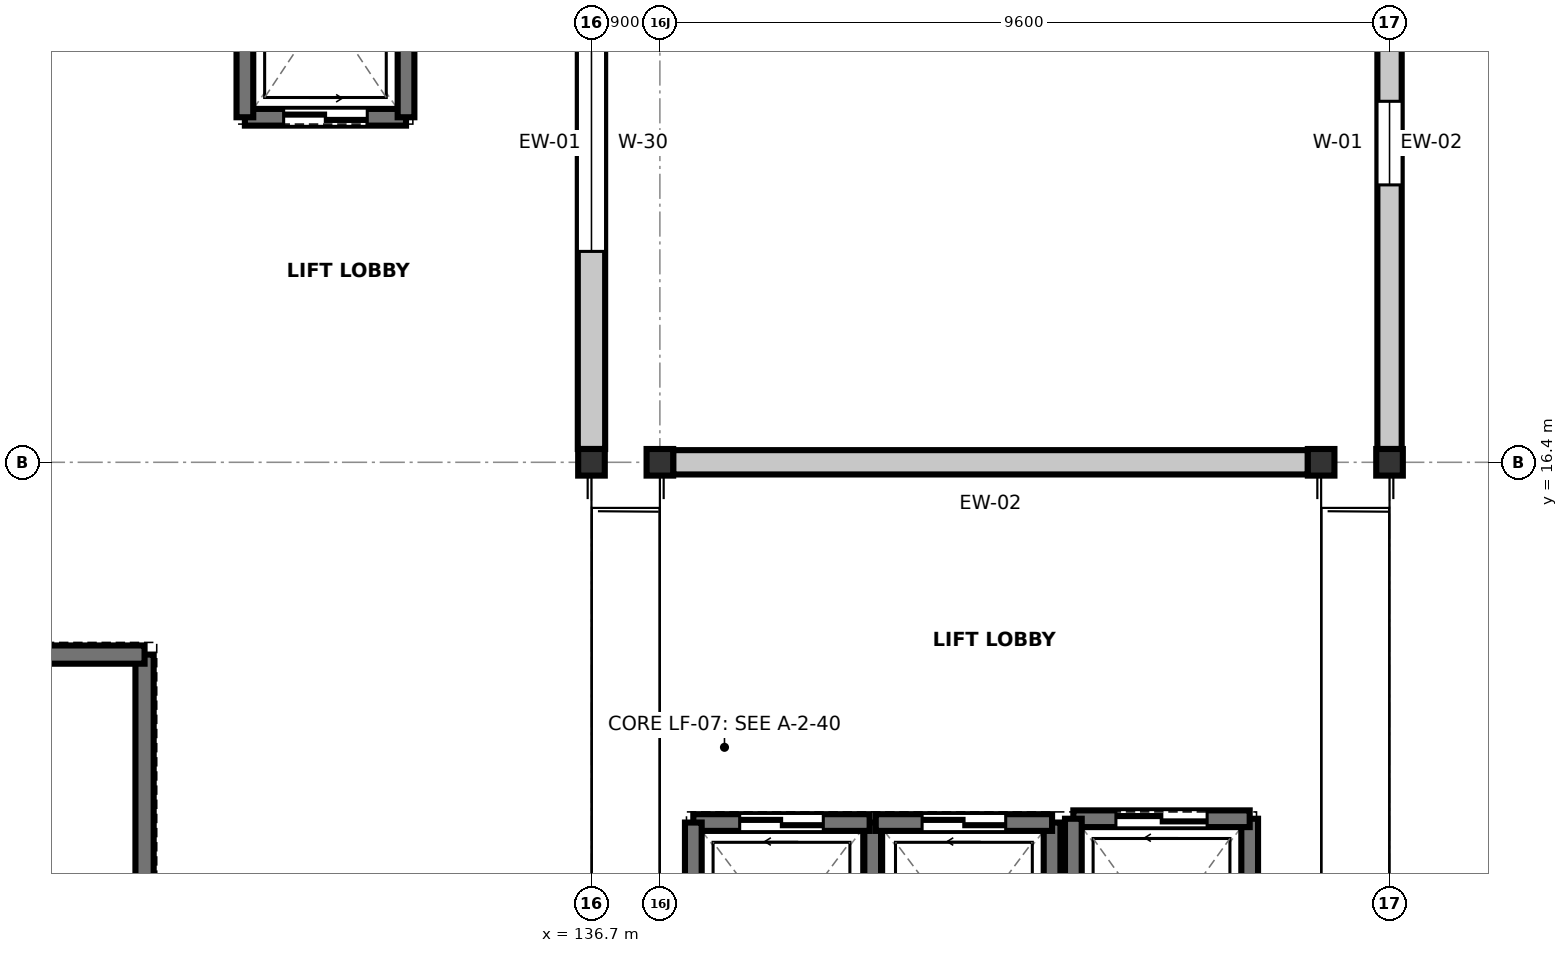
"""IFC4 building model, lengths in metres.
Left out: names, types, materials, properties, quantities, classifications, styles, units other than length and angle.
Written with IfcOpenShell. Run it as: python <this file> out.ifc"""

import sys

from ifc_helpers import new_model, si_unit, direction, frame, frame_2d, origin, origin_2d, place, context, subcontext, project, spatial, rectangle, i_section, extrude, element, fill, save


model = new_model("IFC4")
c1 = context("Model", 3, precision=1e-05, world=origin(), true_north=direction((0.0, 1.0)))
c2 = subcontext(c1, "Body", "Model", "MODEL_VIEW")
j1 = project(units=[si_unit("LENGTHUNIT", "METRE"), si_unit("PLANEANGLEUNIT", "RADIAN")], contexts=[c1])
p1 = place(None, origin())
s1 = spatial("IfcSite", under=j1, at=p1, CompositionType="ELEMENT")
p2 = place(p1, origin())
s2 = spatial("IfcBuilding", under=s1, at=p2, CompositionType="ELEMENT")
p3 = place(p2, frame((0.0, 0.0, 14.4)))
s3 = spatial("IfcBuildingStorey", under=s2, at=p3, CompositionType="ELEMENT", Elevation=14.4)
for number, where, z_axis, x_axis in (
    (1, (136.7, 16.4, 0.0), (0.0, 0.0, 1.0), (1.0, 0.0, 0.0)),
    (2, (137.6, 16.4, 0.0), (0.0, 0.0, 1.0), (1.0, 0.0, 0.0)),
    (3, (146.3, 16.4, 0.0), (0.0, 0.0, 1.0), (1.0, 0.0, 0.0)),
    (4, (147.2, 16.4, 0.0), (0.0, 0.0, 1.0), (1.0, 0.0, 0.0)),
):
    element("IfcColumn", number, at=place(p3, frame(where, z_axis=z_axis, x_axis=x_axis)), inside=s3, PredefinedType="COLUMN", context=c2, shape_type="SweptSolid", body=[
        extrude(i_section(OverallWidth=0.35, OverallDepth=0.35, WebThickness=0.012, FlangeThickness=0.019, FilletRadius=0.02, at=origin_2d()), origin(), (0.0, 0.0, 1.0), 4.8),
    ])
p4 = place(p3, frame((136.7, 16.575, 0.0), z_axis=(0.0, 0.0, 1.0), x_axis=(0.0, 1.0, 0.0)))
e5 = element("IfcWall", 5, at=p4, inside=s3, PredefinedType="STANDARD", context=c2, shape_type="SweptSolid", body=[
    extrude(rectangle(XDim=8.05, YDim=0.36, at=frame_2d((4.025, 0.0))), origin(), (0.0, 0.0, 1.0), 3.515),
])
p5 = place(p4, frame((2.6, 0.0, 0.95)))
e6 = element("IfcOpeningElement", 6, at=p5, cuts=e5, PredefinedType="OPENING", context=c2, shape_type="SweptSolid", body=[
    extrude(rectangle(XDim=2.85, YDim=1.7, at=frame_2d((1.425, 0.85))), frame((0.0, 0.19, 0.0), z_axis=(0.0, -1.0, 0.0), x_axis=(1.0, 0.0, 0.0)), (0.0, 0.0, 1.0), 0.38),
])
p6 = place(p3, frame((146.125, 16.4, 0.0), z_axis=(0.0, 0.0, 1.0), x_axis=(-1.0, 0.0, 0.0)))
e7 = element("IfcWall", 7, at=p6, inside=s3, PredefinedType="STANDARD", context=c2, shape_type="SweptSolid", body=[
    extrude(rectangle(XDim=8.35, YDim=0.32, at=frame_2d((4.175, 0.0))), origin(), (0.0, 0.0, 1.0), 3.535),
])
p7 = place(p3, frame((147.2, 24.625, 0.0), z_axis=(0.0, 0.0, 1.0), x_axis=(0.0, -1.0, 0.0)))
e8 = element("IfcWall", 8, at=p7, inside=s3, PredefinedType="STANDARD", context=c2, shape_type="SweptSolid", body=[
    extrude(rectangle(XDim=8.05, YDim=0.32, at=frame_2d((4.025, 0.0))), origin(), (0.0, 0.0, 1.0), 3.997),
])
p8 = place(p7, frame((3.475, 0.0, 0.95)))
e9 = element("IfcOpeningElement", 9, at=p8, cuts=e8, PredefinedType="OPENING", context=c2, shape_type="SweptSolid", body=[
    extrude(rectangle(XDim=1.1, YDim=1.45, at=frame_2d((0.55, 0.725))), frame((0.0, 0.17, 0.0), z_axis=(0.0, -1.0, 0.0), x_axis=(1.0, 0.0, 0.0)), (0.0, 0.0, 1.0), 0.34),
])
p9 = place(p3, frame((130.82, 9.68, 0.0), z_axis=(0.0, 0.0, 1.0), x_axis=(0.0, 1.0, 0.0)))
e10 = element("IfcWall", 10, at=p9, inside=s3, PredefinedType="SHEAR", context=c2, shape_type="SweptSolid", body=[
    extrude(rectangle(XDim=4.19, YDim=0.24, at=frame_2d((2.095, 0.0))), origin(), (0.0, 0.0, 1.0), 4.5),
])
p10 = place(p3, frame((130.82, 13.87, 0.0), z_axis=(0.0, 0.0, 1.0), x_axis=(-1.0, 0.0, 0.0)))
e11 = element("IfcWall", 11, at=p10, inside=s3, PredefinedType="SHEAR", context=c2, shape_type="SweptSolid", body=[
    extrude(rectangle(XDim=8.54, YDim=0.24, at=frame_2d((4.27, 0.0))), origin(), (0.0, 0.0, 1.0), 4.5),
])
p11 = place(p3, frame((140.4, 8.74, 0.0), z_axis=(0.0, 0.0, 1.0), x_axis=(0.0, 1.0, 0.0)))
e12 = element("IfcWall", 12, at=p11, inside=s3, PredefinedType="SHEAR", context=c2, shape_type="SweptSolid", body=[
    extrude(rectangle(XDim=2.92, YDim=0.22, at=frame_2d((1.46, 0.0))), origin(), (0.0, 0.0, 1.0), 4.5),
])
p12 = place(p3, frame((140.36, 11.66, 0.0), z_axis=(0.0, 0.0, 1.0), x_axis=(-1.0, 0.0, 0.0)))
e13 = element("IfcWall", 13, at=p12, inside=s3, PredefinedType="SHEAR", context=c2, shape_type="SweptSolid", body=[
    extrude(rectangle(XDim=2.32, YDim=0.22, at=frame_2d((1.16, 0.0))), origin(), (0.0, 0.0, 1.0), 4.5),
])
p13 = place(p12, frame((0.61, 0.0, 0.0)))
e14 = element("IfcOpeningElement", 14, at=p13, cuts=e13, PredefinedType="OPENING", context=c2, shape_type="SweptSolid", body=[
    extrude(rectangle(XDim=1.1, YDim=2.15, at=frame_2d((0.55, 1.075))), frame((0.0, 0.12, 0.0), z_axis=(0.0, -1.0, 0.0), x_axis=(1.0, 0.0, 0.0)), (0.0, 0.0, 1.0), 0.24),
])
for number, where, z_axis, x_axis in (
    (15, (138.04, 11.66, 0.0), (0.0, 0.0, 1.0), (0.0, -1.0, 0.0)),
    (16, (142.76, 8.74, 0.0), (0.0, 0.0, 1.0), (0.0, 1.0, 0.0)),
):
    element("IfcWall", number, at=place(p3, frame(where, z_axis=z_axis, x_axis=x_axis)), inside=s3, PredefinedType="SHEAR", context=c2, shape_type="SweptSolid", body=[
        extrude(rectangle(XDim=2.92, YDim=0.22, at=frame_2d((1.46, 0.0))), origin(), (0.0, 0.0, 1.0), 4.5),
    ])
p14 = place(p3, frame((142.76, 11.66, 0.0), z_axis=(0.0, 0.0, 1.0), x_axis=(-1.0, 0.0, 0.0)))
e17 = element("IfcWall", 17, at=p14, inside=s3, PredefinedType="SHEAR", context=c2, shape_type="SweptSolid", body=[
    extrude(rectangle(XDim=2.32, YDim=0.22, at=frame_2d((1.16, 0.0))), origin(), (0.0, 0.0, 1.0), 4.5),
])
p15 = place(p14, frame((0.61, 0.0, 0.0)))
e18 = element("IfcOpeningElement", 18, at=p15, cuts=e17, PredefinedType="OPENING", context=c2, shape_type="SweptSolid", body=[
    extrude(rectangle(XDim=1.1, YDim=2.15, at=frame_2d((0.55, 1.075))), frame((0.0, 0.12, 0.0), z_axis=(0.0, -1.0, 0.0), x_axis=(1.0, 0.0, 0.0)), (0.0, 0.0, 1.0), 0.24),
])
p16 = place(p3, frame((132.14, 20.94, 0.0), z_axis=(0.0, 0.0, 1.0), x_axis=(1.0, 0.0, 0.0)))
e19 = element("IfcWall", 19, at=p16, inside=s3, PredefinedType="SHEAR", context=c2, shape_type="SweptSolid", body=[
    extrude(rectangle(XDim=2.12, YDim=0.22, at=frame_2d((1.06, 0.0))), origin(), (0.0, 0.0, 1.0), 4.5),
])
p17 = place(p16, frame((0.51, 0.0, 0.0)))
e20 = element("IfcOpeningElement", 20, at=p17, cuts=e19, PredefinedType="OPENING", context=c2, shape_type="SweptSolid", body=[
    extrude(rectangle(XDim=1.1, YDim=2.15, at=frame_2d((0.55, 1.075))), frame((0.0, 0.12, 0.0), z_axis=(0.0, -1.0, 0.0), x_axis=(1.0, 0.0, 0.0)), (0.0, 0.0, 1.0), 0.24),
])
for number, where, z_axis, x_axis in (
    (21, (134.26, 20.94, 0.0), (0.0, 0.0, 1.0), (0.0, 1.0, 0.0)),
    (22, (132.14, 23.86, 0.0), (0.0, 0.0, 1.0), (0.0, -1.0, 0.0)),
):
    element("IfcWall", number, at=place(p3, frame(where, z_axis=z_axis, x_axis=x_axis)), inside=s3, PredefinedType="SHEAR", context=c2, shape_type="SweptSolid", body=[
        extrude(rectangle(XDim=2.92, YDim=0.22, at=frame_2d((1.46, 0.0))), origin(), (0.0, 0.0, 1.0), 4.5),
    ])
p18 = place(p3, frame((145.36, 8.69, 0.0), z_axis=(0.0, 0.0, 1.0), x_axis=(0.0, 1.0, 0.0)))
e23 = element("IfcWall", 23, at=p18, inside=s3, PredefinedType="SHEAR", context=c2, shape_type="SweptSolid", body=[
    extrude(rectangle(XDim=3.02, YDim=0.22, at=frame_2d((1.51, 0.0))), origin(), (0.0, 0.0, 1.0), 4.5),
])
p19 = place(p3, frame((145.36, 11.71, 0.0), z_axis=(0.0, 0.0, 1.0), x_axis=(-1.0, 0.0, 0.0)))
e24 = element("IfcWall", 24, at=p19, inside=s3, PredefinedType="SHEAR", context=c2, shape_type="SweptSolid", body=[
    extrude(rectangle(XDim=2.32, YDim=0.22, at=frame_2d((1.16, 0.0))), origin(), (0.0, 0.0, 1.0), 4.5),
])
p20 = place(p19, frame((0.56, 0.0, 0.0)))
e25 = element("IfcOpeningElement", 25, at=p20, cuts=e24, PredefinedType="OPENING", context=c2, shape_type="SweptSolid", body=[
    extrude(rectangle(XDim=1.2, YDim=2.15, at=frame_2d((0.6, 1.075))), frame((0.0, 0.12, 0.0), z_axis=(0.0, -1.0, 0.0), x_axis=(1.0, 0.0, 0.0)), (0.0, 0.0, 1.0), 0.24),
])
p21 = place(p3, frame((143.04, 11.71, 0.0), z_axis=(0.0, 0.0, 1.0), x_axis=(0.0, -1.0, 0.0)))
e26 = element("IfcWall", 26, at=p21, inside=s3, PredefinedType="SHEAR", context=c2, shape_type="SweptSolid", body=[
    extrude(rectangle(XDim=3.02, YDim=0.22, at=frame_2d((1.51, 0.0))), origin(), (0.0, 0.0, 1.0), 4.5),
])
p22 = place(p5, origin())
e27 = element("IfcWindow", 27, at=p22, inside=s3, PartitioningType="SINGLE_PANEL", PredefinedType="WINDOW", context=c2, shape_type="SweptSolid", body=[
    extrude(rectangle(XDim=2.85, YDim=1.7, at=frame_2d((1.425, 0.85))), frame((0.0, 0.03, 0.0), z_axis=(0.0, -1.0, 0.0), x_axis=(1.0, 0.0, 0.0)), (0.0, 0.0, 1.0), 0.06),
])
fill(e6, e27)
p23 = place(p8, origin())
e28 = element("IfcWindow", 28, at=p23, inside=s3, PartitioningType="SINGLE_PANEL", PredefinedType="WINDOW", context=c2, shape_type="SweptSolid", body=[
    extrude(rectangle(XDim=1.1, YDim=1.45, at=frame_2d((0.55, 0.725))), frame((0.0, 0.03, 0.0), z_axis=(0.0, -1.0, 0.0), x_axis=(1.0, 0.0, 0.0)), (0.0, 0.0, 1.0), 0.06),
])
fill(e9, e28)
p24 = place(p13, origin())
e29 = element("IfcDoor", 29, at=p24, inside=s3, OperationType="DOUBLE_DOOR_SLIDING", PredefinedType="DOOR", context=c2, shape_type="SweptSolid", body=[
    extrude(rectangle(XDim=1.1, YDim=2.15, at=frame_2d((0.55, 1.075))), frame((0.0, 0.025, 0.0), z_axis=(0.0, -1.0, 0.0), x_axis=(1.0, 0.0, 0.0)), (0.0, 0.0, 1.0), 0.05),
])
fill(e14, e29)
p25 = place(p15, origin())
e30 = element("IfcDoor", 30, at=p25, inside=s3, OperationType="DOUBLE_DOOR_SLIDING", PredefinedType="DOOR", context=c2, shape_type="SweptSolid", body=[
    extrude(rectangle(XDim=1.1, YDim=2.15, at=frame_2d((0.55, 1.075))), frame((0.0, 0.025, 0.0), z_axis=(0.0, -1.0, 0.0), x_axis=(1.0, 0.0, 0.0)), (0.0, 0.0, 1.0), 0.05),
])
fill(e18, e30)
p26 = place(p17, origin())
e31 = element("IfcDoor", 31, at=p26, inside=s3, OperationType="DOUBLE_DOOR_SLIDING", PredefinedType="DOOR", context=c2, shape_type="SweptSolid", body=[
    extrude(rectangle(XDim=1.1, YDim=2.15, at=frame_2d((0.55, 1.075))), frame((0.0, 0.025, 0.0), z_axis=(0.0, -1.0, 0.0), x_axis=(1.0, 0.0, 0.0)), (0.0, 0.0, 1.0), 0.05),
])
fill(e20, e31)
p27 = place(p20, origin())
e32 = element("IfcDoor", 32, at=p27, inside=s3, OperationType="DOUBLE_DOOR_SLIDING", PredefinedType="DOOR", context=c2, shape_type="SweptSolid", body=[
    extrude(rectangle(XDim=1.2, YDim=2.15, at=frame_2d((0.6, 1.075))), frame((0.0, 0.025, 0.0), z_axis=(0.0, -1.0, 0.0), x_axis=(1.0, 0.0, 0.0)), (0.0, 0.0, 1.0), 0.05),
])
fill(e25, e32)
save(model, sys.argv[1])
